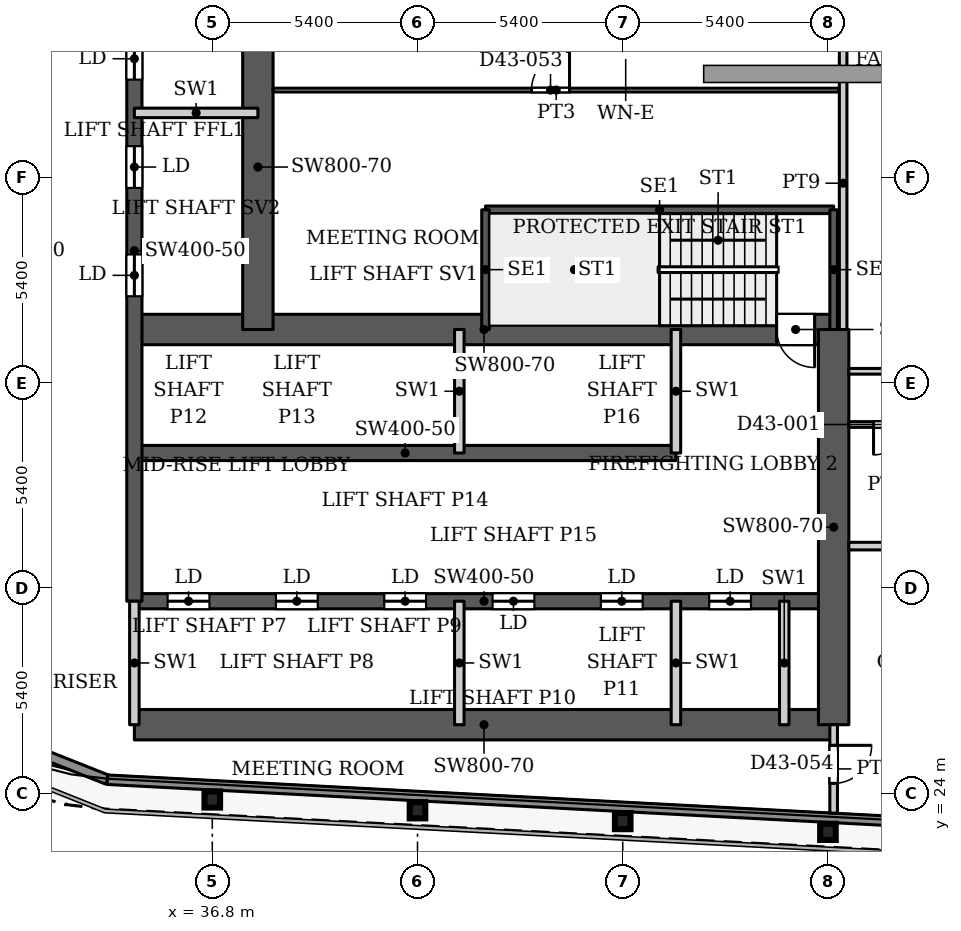
"""IFC4 building model, lengths in metres.
Left out: names, types, materials, properties, quantities, classifications, styles, units other than length and angle.
Written with IfcOpenShell. Run it as: python <this file> out.ifc"""

import sys

from ifc_helpers import new_model, si_unit, direction, frame, frame_2d, origin, origin_2d, place, context, subcontext, project, spatial, rectangle, i_section, extrude, source, transform, mapped, element, fill, save


model = new_model("IFC4")
c1 = context("Model", 3, precision=1e-05, world=origin(), true_north=direction((0.0, 1.0)))
c2 = subcontext(c1, "Body", "Model", "MODEL_VIEW")
j1 = project(units=[si_unit("LENGTHUNIT", "METRE"), si_unit("PLANEANGLEUNIT", "RADIAN")], contexts=[c1])
p1 = place(None, origin())
s1 = spatial("IfcSite", under=j1, at=p1, CompositionType="ELEMENT")
p2 = place(p1, origin())
s2 = spatial("IfcBuilding", under=s1, at=p2, CompositionType="ELEMENT")
p3 = place(p2, frame((0.0, 0.0, 187.7)))
s3 = spatial("IfcBuildingStorey", under=s2, at=p3, CompositionType="ELEMENT", Elevation=187.7)
for number, where, z_axis, x_axis in (
    (1, (53.0, 22.98, 0.0), (0.0, 0.0, 1.0), (1.0, 0.0, 0.0)),
    (2, (47.6, 23.264, 0.0), (0.0, 0.0, 1.0), (1.0, 0.0, 0.0)),
    (3, (42.2, 23.548, 0.0), (0.0, 0.0, 1.0), (1.0, 0.0, 0.0)),
    (4, (36.8, 23.832, 0.0), (0.0, 0.0, 1.0), (1.0, 0.0, 0.0)),
):
    element("IfcColumn", number, at=place(p3, frame(where, z_axis=z_axis, x_axis=x_axis)), inside=s3, PredefinedType="COLUMN", context=c2, shape_type="SweptSolid", body=[
        extrude(i_section(OverallWidth=0.409, OverallDepth=0.425, WebThickness=0.033, FlangeThickness=0.052, FilletRadius=0.013, at=origin_2d()), origin(), (0.0, 0.0, 1.0), 3.9),
    ])
p4 = place(p3, frame((34.75, 25.8, 0.0), z_axis=(0.0, 0.0, 1.0), x_axis=(1.0, 0.0, 0.0)))
e5 = element("IfcWall", 5, at=p4, inside=s3, PredefinedType="SHEAR", context=c2, shape_type="SweptSolid", body=[
    extrude(rectangle(XDim=18.4, YDim=0.8, at=frame_2d((9.2, 0.0))), origin(), (0.0, 0.0, 1.0), 3.9),
])
p5 = place(p3, frame((34.75, 29.05, 0.0), z_axis=(0.0, 0.0, 1.0), x_axis=(1.0, 0.0, 0.0)))
e6 = element("IfcWall", 6, at=p5, inside=s3, PredefinedType="SHEAR", context=c2, shape_type="SweptSolid", body=[
    extrude(rectangle(XDim=18.4, YDim=0.4, at=frame_2d((9.2, 0.0))), origin(), (0.0, 0.0, 1.0), 3.9),
])
p6 = place(p5, frame((0.875, 0.0, 0.0)))
e7 = element("IfcOpeningElement", 7, at=p6, cuts=e6, PredefinedType="OPENING", context=c2, shape_type="SweptSolid", body=[
    extrude(rectangle(XDim=1.1, YDim=2.2, at=frame_2d((0.55, 1.1))), frame((0.0, 0.21, 0.0), z_axis=(0.0, -1.0, 0.0), x_axis=(1.0, 0.0, 0.0)), (0.0, 0.0, 1.0), 0.42),
])
p7 = place(p5, frame((3.725, 0.0, 0.0)))
e8 = element("IfcOpeningElement", 8, at=p7, cuts=e6, PredefinedType="OPENING", context=c2, shape_type="SweptSolid", body=[
    extrude(rectangle(XDim=1.1, YDim=2.2, at=frame_2d((0.55, 1.1))), frame((0.0, 0.21, 0.0), z_axis=(0.0, -1.0, 0.0), x_axis=(1.0, 0.0, 0.0)), (0.0, 0.0, 1.0), 0.42),
])
p8 = place(p5, frame((6.575, 0.0, 0.0)))
e9 = element("IfcOpeningElement", 9, at=p8, cuts=e6, PredefinedType="OPENING", context=c2, shape_type="SweptSolid", body=[
    extrude(rectangle(XDim=1.1, YDim=2.2, at=frame_2d((0.55, 1.1))), frame((0.0, 0.21, 0.0), z_axis=(0.0, -1.0, 0.0), x_axis=(1.0, 0.0, 0.0)), (0.0, 0.0, 1.0), 0.42),
])
p9 = place(p5, frame((9.425, 0.0, 0.0)))
e10 = element("IfcOpeningElement", 10, at=p9, cuts=e6, PredefinedType="OPENING", context=c2, shape_type="SweptSolid", body=[
    extrude(rectangle(XDim=1.1, YDim=2.2, at=frame_2d((0.55, 1.1))), frame((0.0, 0.21, 0.0), z_axis=(0.0, -1.0, 0.0), x_axis=(1.0, 0.0, 0.0)), (0.0, 0.0, 1.0), 0.42),
])
p10 = place(p5, frame((12.275, 0.0, 0.0)))
e11 = element("IfcOpeningElement", 11, at=p10, cuts=e6, PredefinedType="OPENING", context=c2, shape_type="SweptSolid", body=[
    extrude(rectangle(XDim=1.1, YDim=2.2, at=frame_2d((0.55, 1.1))), frame((0.0, 0.21, 0.0), z_axis=(0.0, -1.0, 0.0), x_axis=(1.0, 0.0, 0.0)), (0.0, 0.0, 1.0), 0.42),
])
p11 = place(p5, frame((15.125, 0.0, 0.0)))
e12 = element("IfcOpeningElement", 12, at=p11, cuts=e6, PredefinedType="OPENING", context=c2, shape_type="SweptSolid", body=[
    extrude(rectangle(XDim=1.1, YDim=2.2, at=frame_2d((0.55, 1.1))), frame((0.0, 0.21, 0.0), z_axis=(0.0, -1.0, 0.0), x_axis=(1.0, 0.0, 0.0)), (0.0, 0.0, 1.0), 0.42),
])
p12 = place(p3, frame((34.75, 32.95, 0.0), z_axis=(0.0, 0.0, 1.0), x_axis=(1.0, 0.0, 0.0)))
e13 = element("IfcWall", 13, at=p12, inside=s3, PredefinedType="SHEAR", context=c2, shape_type="SweptSolid", body=[
    extrude(rectangle(XDim=14.25, YDim=0.4, at=frame_2d((7.125, 0.0))), origin(), (0.0, 0.0, 1.0), 3.9),
])
p13 = place(p3, frame((34.75, 36.2, 0.0), z_axis=(0.0, 0.0, 1.0), x_axis=(1.0, 0.0, 0.0)))
e14 = element("IfcWall", 14, at=p13, inside=s3, PredefinedType="SHEAR", context=c2, shape_type="SweptSolid", body=[
    extrude(rectangle(XDim=18.4, YDim=0.8, at=frame_2d((9.2, 0.0))), origin(), (0.0, 0.0, 1.0), 3.9),
])
p14 = place(p13, frame((16.9, 0.0, 0.0)))
e15 = element("IfcOpeningElement", 15, at=p14, cuts=e14, PredefinedType="OPENING", context=c2, shape_type="SweptSolid", body=[
    extrude(rectangle(XDim=1.0, YDim=2.2, at=frame_2d((0.5, 1.1))), frame((0.0, 0.41, 0.0), z_axis=(0.0, -1.0, 0.0), x_axis=(1.0, 0.0, 0.0)), (0.0, 0.0, 1.0), 0.82),
])
p15 = place(p3, frame((34.75, 29.05, 0.0), z_axis=(0.0, 0.0, 1.0), x_axis=(0.0, 1.0, 0.0)))
e16 = element("IfcWall", 16, at=p15, inside=s3, PredefinedType="SHEAR", context=c2, shape_type="SweptSolid", body=[
    extrude(rectangle(XDim=18.45, YDim=0.4, at=frame_2d((9.225, 0.0))), origin(), (0.0, 0.0, 1.0), 3.9),
])
p16 = place(p15, frame((8.025, 0.0, 0.0)))
e17 = element("IfcOpeningElement", 17, at=p16, cuts=e16, PredefinedType="OPENING", context=c2, shape_type="SweptSolid", body=[
    extrude(rectangle(XDim=1.1, YDim=2.2, at=frame_2d((0.55, 1.1))), frame((0.0, 0.21, 0.0), z_axis=(0.0, -1.0, 0.0), x_axis=(1.0, 0.0, 0.0)), (0.0, 0.0, 1.0), 0.42),
])
p17 = place(p15, frame((10.875, 0.0, 0.0)))
e18 = element("IfcOpeningElement", 18, at=p17, cuts=e16, PredefinedType="OPENING", context=c2, shape_type="SweptSolid", body=[
    extrude(rectangle(XDim=1.1, YDim=2.2, at=frame_2d((0.55, 1.1))), frame((0.0, 0.21, 0.0), z_axis=(0.0, -1.0, 0.0), x_axis=(1.0, 0.0, 0.0)), (0.0, 0.0, 1.0), 0.42),
])
p18 = place(p15, frame((13.725, 0.0, 0.0)))
e19 = element("IfcOpeningElement", 19, at=p18, cuts=e16, PredefinedType="OPENING", context=c2, shape_type="SweptSolid", body=[
    extrude(rectangle(XDim=1.1, YDim=2.2, at=frame_2d((0.55, 1.1))), frame((0.0, 0.21, 0.0), z_axis=(0.0, -1.0, 0.0), x_axis=(1.0, 0.0, 0.0)), (0.0, 0.0, 1.0), 0.42),
])
p19 = place(p15, frame((15.95, 0.0, 0.0)))
e20 = element("IfcOpeningElement", 20, at=p19, cuts=e16, PredefinedType="OPENING", context=c2, shape_type="SweptSolid", body=[
    extrude(rectangle(XDim=1.1, YDim=2.2, at=frame_2d((0.55, 1.1))), frame((0.0, 0.21, 0.0), z_axis=(0.0, -1.0, 0.0), x_axis=(1.0, 0.0, 0.0)), (0.0, 0.0, 1.0), 0.42),
])
p20 = place(p3, frame((38.0, 36.2, 0.0), z_axis=(0.0, 0.0, 1.0), x_axis=(0.0, 1.0, 0.0)))
e21 = element("IfcWall", 21, at=p20, inside=s3, PredefinedType="SHEAR", context=c2, shape_type="SweptSolid", body=[
    extrude(rectangle(XDim=8.55, YDim=0.8, at=frame_2d((4.275, 0.0))), origin(), (0.0, 0.0, 1.0), 3.9),
])
p21 = place(p3, frame((53.15, 25.8, 0.0), z_axis=(0.0, 0.0, 1.0), x_axis=(0.0, 1.0, 0.0)))
e22 = element("IfcWall", 22, at=p21, inside=s3, PredefinedType="SHEAR", context=c2, shape_type="SweptSolid", body=[
    extrude(rectangle(XDim=10.4, YDim=0.8, at=frame_2d((5.2, 0.0))), origin(), (0.0, 0.0, 1.0), 3.9),
])
p22 = place(p3, frame((34.039, 24.353, 0.0), z_axis=(0.0, 0.0, 1.0), x_axis=(-0.929352825399, 0.369192803184, 0.0)))
e23 = element("IfcWall", 23, at=p22, inside=s3, PredefinedType="SOLIDWALL", context=c2, shape_type="SweptSolid", body=[
    extrude(rectangle(XDim=4.656, YDim=0.25, at=frame_2d((2.328, 0.0))), origin(), (0.0, 0.0, 1.0), 3.75),
])
p23 = place(p3, frame((100.586, 20.85, 0.0), z_axis=(0.0, 0.0, 1.0), x_axis=(-0.99861746497, 0.052565755559, 0.0)))
e24 = element("IfcWall", 24, at=p23, inside=s3, PredefinedType="SOLIDWALL", context=c2, shape_type="SweptSolid", body=[
    extrude(rectangle(XDim=66.639, YDim=0.25, at=frame_2d((33.319, 0.0))), origin(), (0.0, 0.0, 1.0), 3.75),
])
p24 = place(p3, frame((43.99, 39.35, 0.0), z_axis=(0.0, 0.0, 1.0), x_axis=(1.0, 0.0, 0.0)))
e25 = element("IfcWall", 25, at=p24, inside=s3, PredefinedType="SHEAR", context=c2, shape_type="SweptSolid", body=[
    extrude(rectangle(XDim=9.16, YDim=0.2, at=frame_2d((4.58, 0.0))), origin(), (0.0, 0.0, 1.0), 3.9),
])
for number, where, z_axis, x_axis in (
    (26, (43.99, 36.2, 0.0), (0.0, 0.0, 1.0), (0.0, 1.0, 0.0)),
    (27, (53.15, 36.2, 0.0), (0.0, 0.0, 1.0), (0.0, 1.0, 0.0)),
):
    element("IfcWall", number, at=place(p3, frame(where, z_axis=z_axis, x_axis=x_axis)), inside=s3, PredefinedType="SHEAR", context=c2, shape_type="SweptSolid", body=[
        extrude(rectangle(XDim=3.15, YDim=0.2, at=frame_2d((1.575, 0.0))), origin(), (0.0, 0.0, 1.0), 3.9),
    ])
for number, where, z_axis, x_axis in (
    (28, (34.75, 25.8, 0.0), (0.0, 0.0, 1.0), (0.0, 1.0, 0.0)),
    (29, (43.3, 25.8, 0.0), (0.0, 0.0, 1.0), (0.0, 1.0, 0.0)),
    (30, (43.3, 32.95, 0.0), (0.0, 0.0, 1.0), (0.0, 1.0, 0.0)),
    (31, (49.0, 25.8, 0.0), (0.0, 0.0, 1.0), (0.0, 1.0, 0.0)),
    (32, (49.0, 32.95, 0.0), (0.0, 0.0, 1.0), (0.0, 1.0, 0.0)),
    (33, (51.85, 25.8, 0.0), (0.0, 0.0, 1.0), (0.0, 1.0, 0.0)),
    (34, (34.75, 41.9, 0.0), (0.0, 0.0, 1.0), (1.0, 0.0, 0.0)),
):
    element("IfcWall", number, at=place(p3, frame(where, z_axis=z_axis, x_axis=x_axis)), inside=s3, PredefinedType="PARTITIONING", context=c2, shape_type="SweptSolid", body=[
        extrude(rectangle(XDim=3.25, YDim=0.25, at=frame_2d((1.625, 0.0))), origin(), (0.0, 0.0, 1.0), 3.9),
    ])
p25 = place(p3, frame((38.399, 42.5, 0.0), z_axis=(0.0, 0.0, 1.0), x_axis=(1.0, 0.0, 0.0)))
e35 = element("IfcWall", 35, at=p25, inside=s3, PredefinedType="PARTITIONING", context=c2, shape_type="SweptSolid", body=[
    extrude(rectangle(XDim=14.901, YDim=0.1, at=frame_2d((7.451, 0.0))), origin(), (0.0, 0.0, 1.0), 3.6),
])
p26 = place(p25, frame((6.801, 0.0, 0.0)))
e36 = element("IfcOpeningElement", 36, at=p26, cuts=e35, PredefinedType="OPENING", context=c2, shape_type="SweptSolid", body=[
    extrude(rectangle(XDim=1.0, YDim=2.1, at=frame_2d((0.5, 1.05))), frame((0.0, 0.06, 0.0), z_axis=(0.0, -1.0, 0.0), x_axis=(1.0, 0.0, 0.0)), (0.0, 0.0, 1.0), 0.12),
])
p27 = place(p3, frame((53.15, 23.472, 0.0), z_axis=(0.0, 0.0, 1.0), x_axis=(0.0, 1.0, 0.0)))
e37 = element("IfcWall", 37, at=p27, inside=s3, PredefinedType="PARTITIONING", context=c2, shape_type="SweptSolid", body=[
    extrude(rectangle(XDim=2.328, YDim=0.2, at=frame_2d((1.164, 0.0))), origin(), (0.0, 0.0, 1.0), 3.6),
])
p28 = place(p27, frame((0.785, 0.0, 0.0)))
e38 = element("IfcOpeningElement", 38, at=p28, cuts=e37, PredefinedType="OPENING", context=c2, shape_type="SweptSolid", body=[
    extrude(rectangle(XDim=1.0, YDim=2.1, at=frame_2d((0.5, 1.05))), frame((0.0, 0.11, 0.0), z_axis=(0.0, -1.0, 0.0), x_axis=(1.0, 0.0, 0.0)), (0.0, 0.0, 1.0), 0.22),
])
p29 = place(p3, frame((53.4, 36.199, 0.0), z_axis=(0.0, 0.0, 1.0), x_axis=(0.0, 1.0, 0.0)))
e39 = element("IfcWall", 39, at=p29, inside=s3, PredefinedType="PARTITIONING", context=c2, shape_type="SweptSolid", body=[
    extrude(rectangle(XDim=7.701, YDim=0.2, at=frame_2d((3.851, 0.0))), origin(), (0.0, 0.0, 1.0), 3.6),
])
p30 = place(p3, frame((53.549, 30.5, 0.0), z_axis=(0.0, 0.0, 1.0), x_axis=(1.0, 0.0, 0.0)))
e40 = element("IfcWall", 40, at=p30, inside=s3, PredefinedType="PARTITIONING", context=c2, shape_type="SweptSolid", body=[
    extrude(rectangle(XDim=44.551, YDim=0.2, at=frame_2d((22.275, 0.0))), origin(), (0.0, 0.0, 1.0), 3.6),
])
p31 = place(p30, frame((8.351, 0.0, 0.0)))
e41 = element("IfcOpeningElement", 41, at=p31, cuts=e40, PredefinedType="OPENING", context=c2, shape_type="SweptSolid", body=[
    extrude(rectangle(XDim=1.0, YDim=2.1, at=frame_2d((0.5, 1.05))), frame((0.0, 0.11, 0.0), z_axis=(0.0, -1.0, 0.0), x_axis=(1.0, 0.0, 0.0)), (0.0, 0.0, 1.0), 0.22),
])
p32 = place(p30, frame((12.551, 0.0, 0.0)))
e42 = element("IfcOpeningElement", 42, at=p32, cuts=e40, PredefinedType="OPENING", context=c2, shape_type="SweptSolid", body=[
    extrude(rectangle(XDim=1.0, YDim=2.1, at=frame_2d((0.5, 1.05))), frame((0.0, 0.11, 0.0), z_axis=(0.0, -1.0, 0.0), x_axis=(1.0, 0.0, 0.0)), (0.0, 0.0, 1.0), 0.22),
])
p33 = place(p30, frame((28.751, 0.0, 0.0)))
e43 = element("IfcOpeningElement", 43, at=p33, cuts=e40, PredefinedType="OPENING", context=c2, shape_type="SweptSolid", body=[
    extrude(rectangle(XDim=1.0, YDim=2.1, at=frame_2d((0.5, 1.05))), frame((0.0, 0.11, 0.0), z_axis=(0.0, -1.0, 0.0), x_axis=(1.0, 0.0, 0.0)), (0.0, 0.0, 1.0), 0.22),
])
p34 = place(p30, frame((40.751, 0.0, 0.0)))
e44 = element("IfcOpeningElement", 44, at=p34, cuts=e40, PredefinedType="OPENING", context=c2, shape_type="SweptSolid", body=[
    extrude(rectangle(XDim=1.0, YDim=2.1, at=frame_2d((0.5, 1.05))), frame((0.0, 0.11, 0.0), z_axis=(0.0, -1.0, 0.0), x_axis=(1.0, 0.0, 0.0)), (0.0, 0.0, 1.0), 0.22),
])
p35 = place(p3, frame((53.549, 33.7, 0.0), z_axis=(0.0, 0.0, 1.0), x_axis=(1.0, 0.0, 0.0)))
e45 = element("IfcWall", 45, at=p35, inside=s3, PredefinedType="PARTITIONING", context=c2, shape_type="SweptSolid", body=[
    extrude(rectangle(XDim=7.701, YDim=0.15, at=frame_2d((3.851, 0.0))), origin(), (0.0, 0.0, 1.0), 3.6),
])
p36 = place(p35, frame((0.651, 0.0, 0.0)))
e46 = element("IfcOpeningElement", 46, at=p36, cuts=e45, PredefinedType="OPENING", context=c2, shape_type="SweptSolid", body=[
    extrude(rectangle(XDim=0.8, YDim=2.1, at=frame_2d((0.4, 1.05))), frame((0.0, 0.085, 0.0), z_axis=(0.0, -1.0, 0.0), x_axis=(1.0, 0.0, 0.0)), (0.0, 0.0, 1.0), 0.17),
])
p37 = place(p35, frame((5.401, 0.0, 0.0)))
e47 = element("IfcOpeningElement", 47, at=p37, cuts=e45, PredefinedType="OPENING", context=c2, shape_type="SweptSolid", body=[
    extrude(rectangle(XDim=0.9, YDim=2.1, at=frame_2d((0.45, 1.05))), frame((0.0, 0.085, 0.0), z_axis=(0.0, -1.0, 0.0), x_axis=(1.0, 0.0, 0.0)), (0.0, 0.0, 1.0), 0.17),
])
p38 = place(p35, frame((2.751, 0.0, 0.0)))
e48 = element("IfcOpeningElement", 48, at=p38, cuts=e45, PredefinedType="OPENING", context=c2, shape_type="SweptSolid", body=[
    extrude(rectangle(XDim=0.8, YDim=2.1, at=frame_2d((0.4, 1.05))), frame((0.0, 0.085, 0.0), z_axis=(0.0, -1.0, 0.0), x_axis=(1.0, 0.0, 0.0)), (0.0, 0.0, 1.0), 0.17),
])
p39 = place(p3, frame((53.549, 35.1, 0.0), z_axis=(0.0, 0.0, 1.0), x_axis=(1.0, 0.0, 0.0)))
e49 = element("IfcWall", 49, at=p39, inside=s3, PredefinedType="PARTITIONING", context=c2, shape_type="SweptSolid", body=[
    extrude(rectangle(XDim=11.751, YDim=0.15, at=frame_2d((5.875, 0.0))), origin(), (0.0, 0.0, 1.0), 3.6),
])
p40 = place(p39, frame((5.551, 0.0, 0.0)))
e50 = element("IfcOpeningElement", 50, at=p40, cuts=e49, PredefinedType="OPENING", context=c2, shape_type="SweptSolid", body=[
    extrude(rectangle(XDim=0.9, YDim=2.1, at=frame_2d((0.45, 1.05))), frame((0.0, 0.085, 0.0), z_axis=(0.0, -1.0, 0.0), x_axis=(1.0, 0.0, 0.0)), (0.0, 0.0, 1.0), 0.17),
])
p41 = place(p39, frame((1.751, 0.0, 0.0)))
e51 = element("IfcOpeningElement", 51, at=p41, cuts=e49, PredefinedType="OPENING", context=c2, shape_type="SweptSolid", body=[
    extrude(rectangle(XDim=1.0, YDim=2.1, at=frame_2d((0.5, 1.05))), frame((0.0, 0.085, 0.0), z_axis=(0.0, -1.0, 0.0), x_axis=(1.0, 0.0, 0.0)), (0.0, 0.0, 1.0), 0.17),
])
p42 = place(p39, frame((8.101, 0.0, 0.0)))
e52 = element("IfcOpeningElement", 52, at=p42, cuts=e49, PredefinedType="OPENING", context=c2, shape_type="SweptSolid", body=[
    extrude(rectangle(XDim=0.9, YDim=2.1, at=frame_2d((0.45, 1.05))), frame((0.0, 0.085, 0.0), z_axis=(0.0, -1.0, 0.0), x_axis=(1.0, 0.0, 0.0)), (0.0, 0.0, 1.0), 0.17),
])
m1 = source(origin(), c2, "Body", "SweptSolid", [
    extrude(rectangle(XDim=1.1, YDim=2.2, at=frame_2d((0.55, 1.1))), frame((0.0, 0.025, 0.0), z_axis=(0.0, -1.0, 0.0), x_axis=(1.0, 0.0, 0.0)), (0.0, 0.0, 1.0), 0.05),
])
p43 = place(p6, origin())
e53 = element("IfcDoor", 53, at=p43, inside=s3, OperationType="SLIDING_TO_LEFT", PredefinedType="DOOR", context=c2, shape_type="MappedRepresentation", body=[
    mapped(m1, transform((0.0, 0.0, 0.0), x_axis=(1.0, 0.0, 0.0), y_axis=(0.0, 1.0, 0.0), z_axis=(0.0, 0.0, 1.0), scale=1.0)),
])
fill(e7, e53)
p44 = place(p7, origin())
e54 = element("IfcDoor", 54, at=p44, inside=s3, OperationType="SLIDING_TO_LEFT", PredefinedType="DOOR", context=c2, shape_type="MappedRepresentation", body=[
    mapped(m1, transform((0.0, 0.0, 0.0), x_axis=(1.0, 0.0, 0.0), y_axis=(0.0, 1.0, 0.0), z_axis=(0.0, 0.0, 1.0), scale=1.0)),
])
fill(e8, e54)
p45 = place(p8, origin())
e55 = element("IfcDoor", 55, at=p45, inside=s3, OperationType="SLIDING_TO_LEFT", PredefinedType="DOOR", context=c2, shape_type="MappedRepresentation", body=[
    mapped(m1, transform((0.0, 0.0, 0.0), x_axis=(1.0, 0.0, 0.0), y_axis=(0.0, 1.0, 0.0), z_axis=(0.0, 0.0, 1.0), scale=1.0)),
])
fill(e9, e55)
p46 = place(p9, origin())
e56 = element("IfcDoor", 56, at=p46, inside=s3, OperationType="SLIDING_TO_LEFT", PredefinedType="DOOR", context=c2, shape_type="MappedRepresentation", body=[
    mapped(m1, transform((0.0, 0.0, 0.0), x_axis=(1.0, 0.0, 0.0), y_axis=(0.0, 1.0, 0.0), z_axis=(0.0, 0.0, 1.0), scale=1.0)),
])
fill(e10, e56)
p47 = place(p10, origin())
e57 = element("IfcDoor", 57, at=p47, inside=s3, OperationType="SLIDING_TO_LEFT", PredefinedType="DOOR", context=c2, shape_type="MappedRepresentation", body=[
    mapped(m1, transform((0.0, 0.0, 0.0), x_axis=(1.0, 0.0, 0.0), y_axis=(0.0, 1.0, 0.0), z_axis=(0.0, 0.0, 1.0), scale=1.0)),
])
fill(e11, e57)
p48 = place(p16, origin())
e58 = element("IfcDoor", 58, at=p48, inside=s3, OperationType="SLIDING_TO_LEFT", PredefinedType="DOOR", context=c2, shape_type="MappedRepresentation", body=[
    mapped(m1, transform((0.0, 0.0, 0.0), x_axis=(1.0, 0.0, 0.0), y_axis=(0.0, 1.0, 0.0), z_axis=(0.0, 0.0, 1.0), scale=1.0)),
])
fill(e17, e58)
p49 = place(p17, origin())
e59 = element("IfcDoor", 59, at=p49, inside=s3, OperationType="SLIDING_TO_LEFT", PredefinedType="DOOR", context=c2, shape_type="MappedRepresentation", body=[
    mapped(m1, transform((0.0, 0.0, 0.0), x_axis=(1.0, 0.0, 0.0), y_axis=(0.0, 1.0, 0.0), z_axis=(0.0, 0.0, 1.0), scale=1.0)),
])
fill(e18, e59)
p50 = place(p18, origin())
e60 = element("IfcDoor", 60, at=p50, inside=s3, OperationType="SLIDING_TO_LEFT", PredefinedType="DOOR", context=c2, shape_type="MappedRepresentation", body=[
    mapped(m1, transform((0.0, 0.0, 0.0), x_axis=(1.0, 0.0, 0.0), y_axis=(0.0, 1.0, 0.0), z_axis=(0.0, 0.0, 1.0), scale=1.0)),
])
fill(e19, e60)
p51 = place(p11, origin())
e61 = element("IfcDoor", 61, at=p51, inside=s3, OperationType="SLIDING_TO_LEFT", PredefinedType="DOOR", context=c2, shape_type="MappedRepresentation", body=[
    mapped(m1, transform((0.0, 0.0, 0.0), x_axis=(1.0, 0.0, 0.0), y_axis=(0.0, 1.0, 0.0), z_axis=(0.0, 0.0, 1.0), scale=1.0)),
])
fill(e12, e61)
m2 = source(origin(), c2, "Body", "SweptSolid", [
    extrude(rectangle(XDim=1.0, YDim=2.2, at=frame_2d((0.5, 1.1))), frame((0.0, 0.025, 0.0), z_axis=(0.0, -1.0, 0.0), x_axis=(1.0, 0.0, 0.0)), (0.0, 0.0, 1.0), 0.05),
])
p52 = place(p14, origin())
e62 = element("IfcDoor", 62, at=p52, inside=s3, OperationType="SINGLE_SWING_RIGHT", PredefinedType="DOOR", context=c2, shape_type="MappedRepresentation", body=[
    mapped(m2, transform((0.0, 0.0, 0.0), x_axis=(1.0, 0.0, 0.0), y_axis=(0.0, 1.0, 0.0), z_axis=(0.0, 0.0, 1.0), scale=1.0)),
])
fill(e15, e62)
m3 = source(origin(), c2, "Body", "SweptSolid", [
    extrude(rectangle(XDim=0.8, YDim=2.1, at=frame_2d((0.4, 1.05))), frame((0.0, 0.025, 0.0), z_axis=(0.0, -1.0, 0.0), x_axis=(1.0, 0.0, 0.0)), (0.0, 0.0, 1.0), 0.05),
])
p53 = place(p36, origin())
e63 = element("IfcDoor", 63, at=p53, inside=s3, OperationType="SINGLE_SWING_RIGHT", PredefinedType="DOOR", context=c2, shape_type="MappedRepresentation", body=[
    mapped(m3, transform((0.0, 0.0, 0.0), x_axis=(1.0, 0.0, 0.0), y_axis=(0.0, 1.0, 0.0), z_axis=(0.0, 0.0, 1.0), scale=1.0)),
])
fill(e46, e63)
m4 = source(origin(), c2, "Body", "SweptSolid", [
    extrude(rectangle(XDim=1.0, YDim=2.1, at=frame_2d((0.5, 1.05))), frame((0.0, 0.025, 0.0), z_axis=(0.0, -1.0, 0.0), x_axis=(1.0, 0.0, 0.0)), (0.0, 0.0, 1.0), 0.05),
])
p54 = place(p26, origin())
e64 = element("IfcDoor", 64, at=p54, inside=s3, OperationType="SINGLE_SWING_LEFT", PredefinedType="DOOR", context=c2, shape_type="MappedRepresentation", body=[
    mapped(m4, transform((0.0, 0.0, 0.0), x_axis=(1.0, 0.0, 0.0), y_axis=(0.0, 1.0, 0.0), z_axis=(0.0, 0.0, 1.0), scale=1.0)),
])
fill(e36, e64)
m5 = source(origin(), c2, "Body", "SweptSolid", [
    extrude(rectangle(XDim=1.0, YDim=2.1, at=frame_2d((0.5, 1.05))), frame((0.0, 0.025, 0.0), z_axis=(0.0, -1.0, 0.0), x_axis=(1.0, 0.0, 0.0)), (0.0, 0.0, 1.0), 0.05),
])
p55 = place(p28, origin())
e65 = element("IfcDoor", 65, at=p55, inside=s3, OperationType="SINGLE_SWING_RIGHT", PredefinedType="DOOR", context=c2, shape_type="MappedRepresentation", body=[
    mapped(m5, transform((0.0, 0.0, 0.0), x_axis=(1.0, 0.0, 0.0), y_axis=(0.0, 1.0, 0.0), z_axis=(0.0, 0.0, 1.0), scale=1.0)),
])
fill(e38, e65)
save(model, sys.argv[1])
